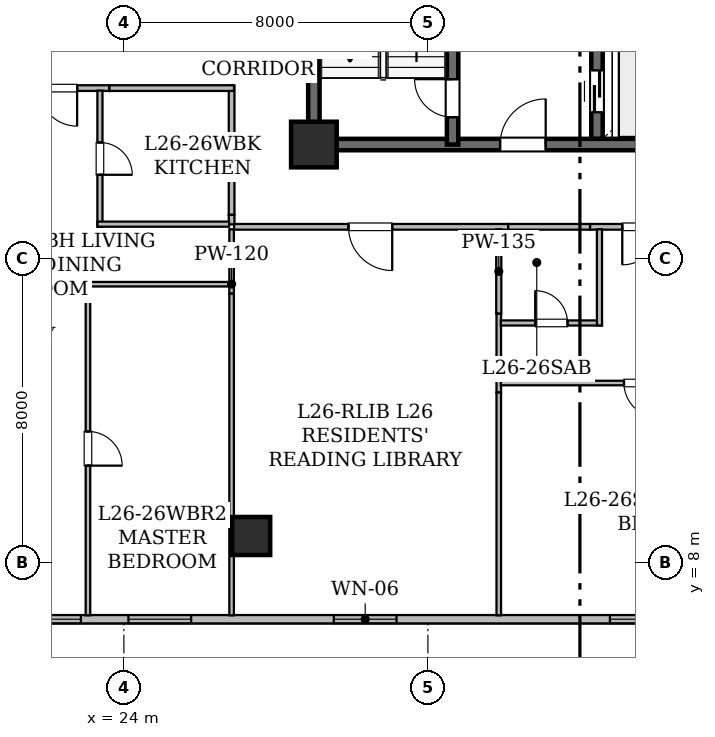
"""IFC4 building model, lengths in metres.
Left out: names, types, materials, properties, quantities, classifications, styles, units other than length and angle.
Written with IfcOpenShell. Run it as: python <this file> out.ifc"""

import sys

from ifc_helpers import new_model, si_unit, direction, frame, frame_2d, origin, origin_2d, place, context, subcontext, project, spatial, rectangle, hollow_rectangle, extrude, element, fill, save


model = new_model("IFC4")
c1 = context("Model", 3, precision=1e-05, world=origin(), true_north=direction((0.0, 1.0)))
c2 = subcontext(c1, "Body", "Model", "MODEL_VIEW")
j1 = project(units=[si_unit("LENGTHUNIT", "METRE"), si_unit("PLANEANGLEUNIT", "RADIAN")], contexts=[c1])
p1 = place(None, origin())
s1 = spatial("IfcSite", under=j1, at=p1, CompositionType="ELEMENT")
p2 = place(p1, origin())
s2 = spatial("IfcBuilding", under=s1, at=p2, CompositionType="ELEMENT")
p3 = place(p2, frame((0.0, 0.0, 105.55)))
s3 = spatial("IfcBuildingStorey", under=s2, at=p3, CompositionType="ELEMENT", Elevation=105.55)
p4 = place(p3, frame((29.0, 19.0, 0.0), z_axis=(0.0, 0.0, 1.0), x_axis=(1.0, 0.0, 0.0)))
e1 = element("IfcColumn", 1, at=p4, inside=s3, PredefinedType="COLUMN", context=c2, shape_type="SweptSolid", body=[
    extrude(hollow_rectangle(XDim=1.2, YDim=1.2, WallThickness=0.06, at=origin_2d()), origin(), (0.0, 0.0, 1.0), 3.65),
])
p5 = place(p3, frame((27.35, 8.7, 0.0), z_axis=(0.0, 0.0, 1.0), x_axis=(1.0, 0.0, 0.0)))
e2 = element("IfcColumn", 2, at=p5, inside=s3, PredefinedType="COLUMN", context=c2, shape_type="SweptSolid", body=[
    extrude(hollow_rectangle(XDim=1.0, YDim=1.0, WallThickness=0.05, at=origin_2d()), origin(), (0.0, 0.0, 1.0), 3.65),
])
p6 = place(p3, frame((52.283, 6.51, 0.0), z_axis=(0.0, 0.0, 1.0), x_axis=(-1.0, 0.0, 0.0)))
e3 = element("IfcWall", 3, at=p6, inside=s3, PredefinedType="STANDARD", context=c2, shape_type="SweptSolid", body=[
    extrude(rectangle(XDim=38.568, YDim=0.22, at=frame_2d((19.284, 0.0))), origin(), (0.0, 0.0, 1.0), 3.43),
])
p7 = place(p6, frame((21.108, 0.0, 0.85)))
e4 = element("IfcOpeningElement", 4, at=p7, cuts=e3, PredefinedType="OPENING", context=c2, shape_type="SweptSolid", body=[
    extrude(rectangle(XDim=1.65, YDim=1.55, at=frame_2d((0.825, 0.775))), frame((0.0, 0.12, 0.0), z_axis=(0.0, -1.0, 0.0), x_axis=(1.0, 0.0, 0.0)), (0.0, 0.0, 1.0), 0.24),
])
p8 = place(p6, frame((35.355, 0.0, 0.85)))
e5 = element("IfcOpeningElement", 5, at=p8, cuts=e3, PredefinedType="OPENING", context=c2, shape_type="SweptSolid", body=[
    extrude(rectangle(XDim=1.65, YDim=1.55, at=frame_2d((0.825, 0.775))), frame((0.0, 0.12, 0.0), z_axis=(0.0, -1.0, 0.0), x_axis=(1.0, 0.0, 0.0)), (0.0, 0.0, 1.0), 0.24),
])
p9 = place(p6, frame((29.413, 0.0, 0.8)))
e6 = element("IfcOpeningElement", 6, at=p9, cuts=e3, PredefinedType="OPENING", context=c2, shape_type="SweptSolid", body=[
    extrude(rectangle(XDim=1.2, YDim=1.5, at=frame_2d((0.6, 0.75))), frame((0.0, 0.12, 0.0), z_axis=(0.0, -1.0, 0.0), x_axis=(1.0, 0.0, 0.0)), (0.0, 0.0, 1.0), 0.24),
])
p10 = place(p6, frame((31.863, 0.0, 0.85)))
e7 = element("IfcOpeningElement", 7, at=p10, cuts=e3, PredefinedType="OPENING", context=c2, shape_type="SweptSolid", body=[
    extrude(rectangle(XDim=1.65, YDim=1.55, at=frame_2d((0.825, 0.775))), frame((0.0, 0.12, 0.0), z_axis=(0.0, -1.0, 0.0), x_axis=(1.0, 0.0, 0.0)), (0.0, 0.0, 1.0), 0.24),
])
p11 = place(p6, frame((26.513, 0.0, 0.85)))
e8 = element("IfcOpeningElement", 8, at=p11, cuts=e3, PredefinedType="OPENING", context=c2, shape_type="SweptSolid", body=[
    extrude(rectangle(XDim=1.65, YDim=1.55, at=frame_2d((0.825, 0.775))), frame((0.0, 0.12, 0.0), z_axis=(0.0, -1.0, 0.0), x_axis=(1.0, 0.0, 0.0)), (0.0, 0.0, 1.0), 0.24),
])
p12 = place(p6, frame((13.843, 0.0, 0.85)))
e9 = element("IfcOpeningElement", 9, at=p12, cuts=e3, PredefinedType="OPENING", context=c2, shape_type="SweptSolid", body=[
    extrude(rectangle(XDim=1.65, YDim=1.55, at=frame_2d((0.825, 0.775))), frame((0.0, 0.12, 0.0), z_axis=(0.0, -1.0, 0.0), x_axis=(1.0, 0.0, 0.0)), (0.0, 0.0, 1.0), 0.24),
])
p13 = place(p6, frame((1.479, 0.0, 0.85)))
e10 = element("IfcOpeningElement", 10, at=p13, cuts=e3, PredefinedType="OPENING", context=c2, shape_type="SweptSolid", body=[
    extrude(rectangle(XDim=1.65, YDim=1.55, at=frame_2d((0.825, 0.775))), frame((0.0, 0.12, 0.0), z_axis=(0.0, -1.0, 0.0), x_axis=(1.0, 0.0, 0.0)), (0.0, 0.0, 1.0), 0.24),
])
p14 = place(p3, frame((29.0, 19.0, 0.0), z_axis=(0.0, 0.0, 1.0), x_axis=(0.0, 1.0, 0.0)))
e11 = element("IfcWall", 11, at=p14, inside=s3, PredefinedType="SHEAR", context=c2, shape_type="SweptSolid", body=[
    extrude(rectangle(XDim=9.0, YDim=0.3, at=frame_2d((4.5, 0.0))), origin(), (0.0, 0.0, 1.0), 3.43),
])
p15 = place(p3, frame((29.0, 19.0, 0.0), z_axis=(0.0, 0.0, 1.0), x_axis=(1.0, 0.0, 0.0)))
e12 = element("IfcWall", 12, at=p15, inside=s3, PredefinedType="SHEAR", context=c2, shape_type="SweptSolid", body=[
    extrude(rectangle(XDim=10.4, YDim=0.3, at=frame_2d((5.2, 0.0))), origin(), (0.0, 0.0, 1.0), 3.43),
])
p16 = place(p15, frame((4.9, 0.0, 0.0)))
e13 = element("IfcOpeningElement", 13, at=p16, cuts=e12, PredefinedType="OPENING", context=c2, shape_type="SweptSolid", body=[
    extrude(rectangle(XDim=1.2, YDim=2.15, at=frame_2d((0.6, 1.075))), frame((0.0, 0.16, 0.0), z_axis=(0.0, -1.0, 0.0), x_axis=(1.0, 0.0, 0.0)), (0.0, 0.0, 1.0), 0.32),
])
p17 = place(p3, frame((32.65, 19.0, 0.0), z_axis=(0.0, 0.0, 1.0), x_axis=(0.0, 1.0, 0.0)))
e14 = element("IfcWall", 14, at=p17, inside=s3, PredefinedType="SHEAR", context=c2, shape_type="SweptSolid", body=[
    extrude(rectangle(XDim=9.0, YDim=0.3, at=frame_2d((4.5, 0.0))), origin(), (0.0, 0.0, 1.0), 3.43),
])
p18 = place(p17, frame((0.72, 0.0, 0.0)))
e15 = element("IfcOpeningElement", 15, at=p18, cuts=e14, PredefinedType="OPENING", context=c2, shape_type="SweptSolid", body=[
    extrude(rectangle(XDim=1.0, YDim=2.15, at=frame_2d((0.5, 1.075))), frame((0.0, 0.16, 0.0), z_axis=(0.0, -1.0, 0.0), x_axis=(1.0, 0.0, 0.0)), (0.0, 0.0, 1.0), 0.32),
])
p19 = place(p3, frame((36.45, 19.154, 0.0), z_axis=(0.0, 0.0, 1.0), x_axis=(0.0, 1.0, 0.0)))
e16 = element("IfcWall", 16, at=p19, inside=s3, PredefinedType="SHEAR", context=c2, shape_type="SweptSolid", body=[
    extrude(rectangle(XDim=4.646, YDim=0.3, at=frame_2d((2.323, 0.0))), origin(), (0.0, 0.0, 1.0), 3.43),
])
p20 = place(p19, frame((0.696, 0.0, 0.0)))
e17 = element("IfcOpeningElement", 17, at=p20, cuts=e16, PredefinedType="OPENING", context=c2, shape_type="SweptSolid", body=[
    extrude(rectangle(XDim=1.1, YDim=2.15, at=frame_2d((0.55, 1.075))), frame((0.0, 0.16, 0.0), z_axis=(0.0, -1.0, 0.0), x_axis=(1.0, 0.0, 0.0)), (0.0, 0.0, 1.0), 0.32),
])
p21 = place(p19, frame((3.316, 0.0, 0.0)))
e18 = element("IfcOpeningElement", 18, at=p21, cuts=e16, PredefinedType="OPENING", context=c2, shape_type="SweptSolid", body=[
    extrude(rectangle(XDim=1.1, YDim=2.15, at=frame_2d((0.55, 1.075))), frame((0.0, 0.16, 0.0), z_axis=(0.0, -1.0, 0.0), x_axis=(1.0, 0.0, 0.0)), (0.0, 0.0, 1.0), 0.32),
])
p22 = place(p3, frame((34.114, 16.835, 0.0), z_axis=(0.0, 0.0, 1.0), x_axis=(-1.0, 0.0, 0.0)))
e19 = element("IfcWall", 19, at=p22, inside=s3, PredefinedType="STANDARD", context=c2, shape_type="SweptSolid", body=[
    extrude(rectangle(XDim=7.214, YDim=0.15, at=frame_2d((3.607, 0.0))), origin(), (0.0, 0.0, 1.0), 2.647),
])
p23 = place(p22, frame((3.053, 0.0, 0.0)))
e20 = element("IfcOpeningElement", 20, at=p23, cuts=e19, PredefinedType="OPENING", context=c2, shape_type="SweptSolid", body=[
    extrude(rectangle(XDim=1.15, YDim=2.2, at=frame_2d((0.575, 1.1))), frame((0.0, 0.085, 0.0), z_axis=(0.0, -1.0, 0.0), x_axis=(1.0, 0.0, 0.0)), (0.0, 0.0, 1.0), 0.17),
])
p24 = place(p3, frame((26.835, 16.9, 0.0), z_axis=(0.0, 0.0, 1.0), x_axis=(0.0, 1.0, 0.0)))
e21 = element("IfcWall", 21, at=p24, inside=s3, PredefinedType="STANDARD", context=c2, shape_type="SweptSolid", body=[
    extrude(rectangle(XDim=0.254, YDim=0.15, at=frame_2d((0.127, 0.0))), origin(), (0.0, 0.0, 1.0), 3.43),
])
p25 = place(p3, frame((23.619, 20.485, 0.0), z_axis=(0.0, 0.0, 1.0), x_axis=(-1.0, 0.0, 0.0)))
e22 = element("IfcWall", 22, at=p25, inside=s3, PredefinedType="STANDARD", context=c2, shape_type="SweptSolid", body=[
    extrude(rectangle(XDim=2.698, YDim=0.15, at=frame_2d((1.349, 0.0))), origin(), (0.0, 0.0, 1.0), 3.43),
])
p26 = place(p25, frame((0.849, 0.0, 0.0)))
e23 = element("IfcOpeningElement", 23, at=p26, cuts=e22, PredefinedType="OPENING", context=c2, shape_type="SweptSolid", body=[
    extrude(rectangle(XDim=1.0, YDim=2.15, at=frame_2d((0.5, 1.075))), frame((0.0, 0.085, 0.0), z_axis=(0.0, -1.0, 0.0), x_axis=(1.0, 0.0, 0.0)), (0.0, 0.0, 1.0), 0.17),
])
p27 = place(p3, frame((26.835, 17.154, 0.0), z_axis=(0.0, 0.0, 1.0), x_axis=(0.0, 1.0, 0.0)))
e24 = element("IfcWall", 24, at=p27, inside=s3, PredefinedType="STANDARD", context=c2, shape_type="SweptSolid", body=[
    extrude(rectangle(XDim=3.396, YDim=0.15, at=frame_2d((1.698, 0.0))), origin(), (0.0, 0.0, 1.0), 2.647),
])
p28 = place(p3, frame((26.898, 20.485, 0.0), z_axis=(0.0, 0.0, 1.0), x_axis=(-1.0, 0.0, 0.0)))
e25 = element("IfcWall", 25, at=p28, inside=s3, PredefinedType="STANDARD", context=c2, shape_type="SweptSolid", body=[
    extrude(rectangle(XDim=3.279, YDim=0.15, at=frame_2d((1.64, 0.0))), origin(), (0.0, 0.0, 1.0), 3.43),
])
p29 = place(p3, frame((38.964, 16.835, 0.0), z_axis=(0.0, 0.0, 1.0), x_axis=(-1.0, 0.0, 0.0)))
e26 = element("IfcWall", 26, at=p29, inside=s3, PredefinedType="STANDARD", context=c2, shape_type="SweptSolid", body=[
    extrude(rectangle(XDim=2.698, YDim=0.15, at=frame_2d((1.349, 0.0))), origin(), (0.0, 0.0, 1.0), 3.43),
])
p30 = place(p29, frame((0.849, 0.0, 0.0)))
e27 = element("IfcOpeningElement", 27, at=p30, cuts=e26, PredefinedType="OPENING", context=c2, shape_type="SweptSolid", body=[
    extrude(rectangle(XDim=1.0, YDim=2.15, at=frame_2d((0.5, 1.075))), frame((0.0, 0.085, 0.0), z_axis=(0.0, -1.0, 0.0), x_axis=(1.0, 0.0, 0.0)), (0.0, 0.0, 1.0), 0.17),
])
p31 = place(p3, frame((36.266, 16.835, 0.0), z_axis=(0.0, 0.0, 1.0), x_axis=(-1.0, 0.0, 0.0)))
e28 = element("IfcWall", 28, at=p31, inside=s3, PredefinedType="STANDARD", context=c2, shape_type="SweptSolid", body=[
    extrude(rectangle(XDim=2.152, YDim=0.15, at=frame_2d((1.076, 0.0))), origin(), (0.0, 0.0, 1.0), 3.43),
])
p32 = place(p3, frame((26.835, 15.076, 0.0), z_axis=(0.0, 0.0, 1.0), x_axis=(0.0, 1.0, 0.0)))
e29 = element("IfcWall", 29, at=p32, inside=s3, PredefinedType="PARTITIONING", context=c2, shape_type="SweptSolid", body=[
    extrude(rectangle(XDim=1.694, YDim=0.12, at=frame_2d((0.847, 0.0))), origin(), (0.0, 0.0, 1.0), 3.43),
])
p33 = place(p3, frame((26.835, 6.612, 0.0), z_axis=(0.0, 0.0, 1.0), x_axis=(0.0, 1.0, 0.0)))
e30 = element("IfcWall", 30, at=p33, inside=s3, PredefinedType="PARTITIONING", context=c2, shape_type="SweptSolid", body=[
    extrude(rectangle(XDim=8.464, YDim=0.12, at=frame_2d((4.232, 0.0))), origin(), (0.0, 0.0, 1.0), 2.876),
])
p34 = place(p3, frame((33.865, 14.554, 0.0), z_axis=(0.0, 0.0, 1.0), x_axis=(0.0, -1.0, 0.0)))
e31 = element("IfcWall", 31, at=p34, inside=s3, PredefinedType="PARTITIONING", context=c2, shape_type="SweptSolid", body=[
    extrude(rectangle(XDim=2.078, YDim=0.12, at=frame_2d((1.039, 0.0))), origin(), (0.0, 0.0, 1.0), 3.43),
])
p35 = place(p3, frame((33.865, 16.77, 0.0), z_axis=(0.0, 0.0, 1.0), x_axis=(0.0, -1.0, 0.0)))
e32 = element("IfcWall", 32, at=p35, inside=s3, PredefinedType="PARTITIONING", context=c2, shape_type="SweptSolid", body=[
    extrude(rectangle(XDim=2.216, YDim=0.135, at=frame_2d((1.108, 0.0))), origin(), (0.0, 0.0, 1.0), 3.43),
])
p36 = place(p3, frame((33.865, 12.476, 0.0), z_axis=(0.0, 0.0, 1.0), x_axis=(0.0, -1.0, 0.0)))
e33 = element("IfcWall", 33, at=p36, inside=s3, PredefinedType="PARTITIONING", context=c2, shape_type="SweptSolid", body=[
    extrude(rectangle(XDim=5.864, YDim=0.12, at=frame_2d((2.932, 0.0))), origin(), (0.0, 0.0, 1.0), 2.876),
])
p37 = place(p3, frame((23.37, 20.418, 0.0), z_axis=(0.0, 0.0, 1.0), x_axis=(0.0, -1.0, 0.0)))
e34 = element("IfcWall", 34, at=p37, inside=s3, PredefinedType="PARTITIONING", context=c2, shape_type="SweptSolid", body=[
    extrude(rectangle(XDim=3.578, YDim=0.135, at=frame_2d((1.789, 0.0))), origin(), (0.0, 0.0, 1.0), 2.647),
])
p38 = place(p37, frame((1.364, 0.0, 0.0)))
e35 = element("IfcOpeningElement", 35, at=p38, cuts=e34, PredefinedType="OPENING", context=c2, shape_type="SweptSolid", body=[
    extrude(rectangle(XDim=0.85, YDim=2.1, at=frame_2d((0.425, 1.05))), frame((0.0, 0.077, 0.0), z_axis=(0.0, -1.0, 0.0), x_axis=(1.0, 0.0, 0.0)), (0.0, 0.0, 1.0), 0.155),
])
p39 = place(p3, frame((23.305, 16.905, 0.0), z_axis=(0.0, 0.0, 1.0), x_axis=(1.0, 0.0, 0.0)))
e36 = element("IfcWall", 36, at=p39, inside=s3, PredefinedType="PARTITIONING", context=c2, shape_type="SweptSolid", body=[
    extrude(rectangle(XDim=3.465, YDim=0.135, at=frame_2d((1.732, 0.0))), origin(), (0.0, 0.0, 1.0), 3.43),
])
p40 = place(p3, frame((26.781, 15.325, 0.0), z_axis=(0.0, 0.0, 1.0), x_axis=(-1.0, 0.0, 0.0)))
e37 = element("IfcWall", 37, at=p40, inside=s3, PredefinedType="PARTITIONING", context=c2, shape_type="SweptSolid", body=[
    extrude(rectangle(XDim=3.791, YDim=0.12, at=frame_2d((1.896, 0.0))), origin(), (0.0, 0.0, 1.0), 3.43),
])
p41 = place(p3, frame((23.055, 15.39, 0.0), z_axis=(0.0, 0.0, 1.0), x_axis=(0.0, -1.0, 0.0)))
e38 = element("IfcWall", 38, at=p41, inside=s3, PredefinedType="PARTITIONING", context=c2, shape_type="SweptSolid", body=[
    extrude(rectangle(XDim=8.778, YDim=0.12, at=frame_2d((4.389, 0.0))), origin(), (0.0, 0.0, 1.0), 2.876),
])
p42 = place(p41, frame((3.939, 0.0, 0.0)))
e39 = element("IfcOpeningElement", 39, at=p42, cuts=e38, PredefinedType="OPENING", context=c2, shape_type="SweptSolid", body=[
    extrude(rectangle(XDim=0.9, YDim=2.1, at=frame_2d((0.45, 1.05))), frame((0.0, 0.07, 0.0), z_axis=(0.0, -1.0, 0.0), x_axis=(1.0, 0.0, 0.0)), (0.0, 0.0, 1.0), 0.14),
])
p43 = place(p3, frame((33.919, 14.305, 0.0), z_axis=(0.0, 0.0, 1.0), x_axis=(1.0, 0.0, 0.0)))
e40 = element("IfcWall", 40, at=p43, inside=s3, PredefinedType="PARTITIONING", context=c2, shape_type="SweptSolid", body=[
    extrude(rectangle(XDim=2.661, YDim=0.135, at=frame_2d((1.331, 0.0))), origin(), (0.0, 0.0, 1.0), 3.43),
])
p44 = place(p43, frame((0.905, 0.0, 0.0)))
e41 = element("IfcOpeningElement", 41, at=p44, cuts=e40, PredefinedType="OPENING", context=c2, shape_type="SweptSolid", body=[
    extrude(rectangle(XDim=0.85, YDim=2.1, at=frame_2d((0.425, 1.05))), frame((0.0, 0.077, 0.0), z_axis=(0.0, -1.0, 0.0), x_axis=(1.0, 0.0, 0.0)), (0.0, 0.0, 1.0), 0.155),
])
p45 = place(p3, frame((36.515, 14.24, 0.0), z_axis=(0.0, 0.0, 1.0), x_axis=(0.0, 1.0, 0.0)))
e42 = element("IfcWall", 42, at=p45, inside=s3, PredefinedType="PARTITIONING", context=c2, shape_type="SweptSolid", body=[
    extrude(rectangle(XDim=2.53, YDim=0.135, at=frame_2d((1.265, 0.0))), origin(), (0.0, 0.0, 1.0), 3.43),
])
p46 = place(p3, frame((41.3, 12.725, 0.0), z_axis=(0.0, 0.0, 1.0), x_axis=(-1.0, 0.0, 0.0)))
e43 = element("IfcWall", 43, at=p46, inside=s3, PredefinedType="PARTITIONING", context=c2, shape_type="SweptSolid", body=[
    extrude(rectangle(XDim=7.381, YDim=0.12, at=frame_2d((3.69, 0.0))), origin(), (0.0, 0.0, 1.0), 2.647),
])
p47 = place(p46, frame((3.24, 0.0, 0.0)))
e44 = element("IfcOpeningElement", 44, at=p47, cuts=e43, PredefinedType="OPENING", context=c2, shape_type="SweptSolid", body=[
    extrude(rectangle(XDim=0.9, YDim=2.1, at=frame_2d((0.45, 1.05))), frame((0.0, 0.07, 0.0), z_axis=(0.0, -1.0, 0.0), x_axis=(1.0, 0.0, 0.0)), (0.0, 0.0, 1.0), 0.14),
])
p48 = place(p7, origin())
e45 = element("IfcWindow", 45, at=p48, inside=s3, PartitioningType="SINGLE_PANEL", PredefinedType="WINDOW", context=c2, shape_type="SweptSolid", body=[
    extrude(rectangle(XDim=1.65, YDim=1.55, at=frame_2d((0.825, 0.775))), frame((0.0, 0.03, 0.0), z_axis=(0.0, -1.0, 0.0), x_axis=(1.0, 0.0, 0.0)), (0.0, 0.0, 1.0), 0.06),
])
fill(e4, e45)
p49 = place(p9, origin())
e46 = element("IfcWindow", 46, at=p49, inside=s3, PartitioningType="SINGLE_PANEL", PredefinedType="WINDOW", context=c2, shape_type="SweptSolid", body=[
    extrude(rectangle(XDim=1.2, YDim=1.5, at=frame_2d((0.6, 0.75))), frame((0.0, 0.03, 0.0), z_axis=(0.0, -1.0, 0.0), x_axis=(1.0, 0.0, 0.0)), (0.0, 0.0, 1.0), 0.06),
])
fill(e6, e46)
p50 = place(p11, origin())
e47 = element("IfcWindow", 47, at=p50, inside=s3, PartitioningType="SINGLE_PANEL", PredefinedType="WINDOW", context=c2, shape_type="SweptSolid", body=[
    extrude(rectangle(XDim=1.65, YDim=1.55, at=frame_2d((0.825, 0.775))), frame((0.0, 0.03, 0.0), z_axis=(0.0, -1.0, 0.0), x_axis=(1.0, 0.0, 0.0)), (0.0, 0.0, 1.0), 0.06),
])
fill(e8, e47)
p51 = place(p12, origin())
e48 = element("IfcWindow", 48, at=p51, inside=s3, PartitioningType="SINGLE_PANEL", PredefinedType="WINDOW", context=c2, shape_type="SweptSolid", body=[
    extrude(rectangle(XDim=1.65, YDim=1.55, at=frame_2d((0.825, 0.775))), frame((0.0, 0.03, 0.0), z_axis=(0.0, -1.0, 0.0), x_axis=(1.0, 0.0, 0.0)), (0.0, 0.0, 1.0), 0.06),
])
fill(e9, e48)
p52 = place(p18, origin())
e49 = element("IfcDoor", 49, at=p52, inside=s3, OperationType="SINGLE_SWING_RIGHT", PredefinedType="DOOR", context=c2, shape_type="SweptSolid", body=[
    extrude(rectangle(XDim=1.0, YDim=2.15, at=frame_2d((0.5, 1.075))), frame((0.0, 0.025, 0.0), z_axis=(0.0, -1.0, 0.0), x_axis=(1.0, 0.0, 0.0)), (0.0, 0.0, 1.0), 0.05),
])
fill(e15, e49)
p53 = place(p16, origin())
e50 = element("IfcDoor", 50, at=p53, inside=s3, OperationType="SINGLE_SWING_RIGHT", PredefinedType="DOOR", context=c2, shape_type="SweptSolid", body=[
    extrude(rectangle(XDim=1.2, YDim=2.15, at=frame_2d((0.6, 1.075))), frame((0.0, 0.025, 0.0), z_axis=(0.0, -1.0, 0.0), x_axis=(1.0, 0.0, 0.0)), (0.0, 0.0, 1.0), 0.05),
])
fill(e13, e50)
p54 = place(p20, origin())
e51 = element("IfcDoor", 51, at=p54, inside=s3, OperationType="SLIDING_TO_LEFT", PredefinedType="DOOR", context=c2, shape_type="SweptSolid", body=[
    extrude(rectangle(XDim=1.1, YDim=2.15, at=frame_2d((0.55, 1.075))), frame((0.0, 0.025, 0.0), z_axis=(0.0, -1.0, 0.0), x_axis=(1.0, 0.0, 0.0)), (0.0, 0.0, 1.0), 0.05),
])
fill(e17, e51)
p55 = place(p23, origin())
e52 = element("IfcDoor", 52, at=p55, inside=s3, OperationType="SINGLE_SWING_LEFT", PredefinedType="DOOR", context=c2, shape_type="SweptSolid", body=[
    extrude(rectangle(XDim=1.15, YDim=2.2, at=frame_2d((0.575, 1.1))), frame((0.0, 0.025, 0.0), z_axis=(0.0, -1.0, 0.0), x_axis=(1.0, 0.0, 0.0)), (0.0, 0.0, 1.0), 0.05),
])
fill(e20, e52)
p56 = place(p26, origin())
e53 = element("IfcDoor", 53, at=p56, inside=s3, OperationType="SINGLE_SWING_LEFT", PredefinedType="DOOR", context=c2, shape_type="SweptSolid", body=[
    extrude(rectangle(XDim=1.0, YDim=2.15, at=frame_2d((0.5, 1.075))), frame((0.0, 0.025, 0.0), z_axis=(0.0, -1.0, 0.0), x_axis=(1.0, 0.0, 0.0)), (0.0, 0.0, 1.0), 0.05),
])
fill(e23, e53)
p57 = place(p30, origin())
e54 = element("IfcDoor", 54, at=p57, inside=s3, OperationType="SINGLE_SWING_RIGHT", PredefinedType="DOOR", context=c2, shape_type="SweptSolid", body=[
    extrude(rectangle(XDim=1.0, YDim=2.15, at=frame_2d((0.5, 1.075))), frame((0.0, 0.025, 0.0), z_axis=(0.0, -1.0, 0.0), x_axis=(1.0, 0.0, 0.0)), (0.0, 0.0, 1.0), 0.05),
])
fill(e27, e54)
p58 = place(p38, origin())
e55 = element("IfcDoor", 55, at=p58, inside=s3, OperationType="SINGLE_SWING_RIGHT", PredefinedType="DOOR", context=c2, shape_type="SweptSolid", body=[
    extrude(rectangle(XDim=0.85, YDim=2.1, at=frame_2d((0.425, 1.05))), frame((0.0, 0.025, 0.0), z_axis=(0.0, -1.0, 0.0), x_axis=(1.0, 0.0, 0.0)), (0.0, 0.0, 1.0), 0.05),
])
fill(e35, e55)
p59 = place(p42, origin())
e56 = element("IfcDoor", 56, at=p59, inside=s3, OperationType="SINGLE_SWING_RIGHT", PredefinedType="DOOR", context=c2, shape_type="SweptSolid", body=[
    extrude(rectangle(XDim=0.9, YDim=2.1, at=frame_2d((0.45, 1.05))), frame((0.0, 0.025, 0.0), z_axis=(0.0, -1.0, 0.0), x_axis=(1.0, 0.0, 0.0)), (0.0, 0.0, 1.0), 0.05),
])
fill(e39, e56)
p60 = place(p44, origin())
e57 = element("IfcDoor", 57, at=p60, inside=s3, OperationType="SINGLE_SWING_LEFT", PredefinedType="DOOR", context=c2, shape_type="SweptSolid", body=[
    extrude(rectangle(XDim=0.85, YDim=2.1, at=frame_2d((0.425, 1.05))), frame((0.0, 0.025, 0.0), z_axis=(0.0, -1.0, 0.0), x_axis=(1.0, 0.0, 0.0)), (0.0, 0.0, 1.0), 0.05),
])
fill(e41, e57)
p61 = place(p47, origin())
e58 = element("IfcDoor", 58, at=p61, inside=s3, OperationType="SINGLE_SWING_LEFT", PredefinedType="DOOR", context=c2, shape_type="SweptSolid", body=[
    extrude(rectangle(XDim=0.9, YDim=2.1, at=frame_2d((0.45, 1.05))), frame((0.0, 0.025, 0.0), z_axis=(0.0, -1.0, 0.0), x_axis=(1.0, 0.0, 0.0)), (0.0, 0.0, 1.0), 0.05),
])
fill(e44, e58)
save(model, sys.argv[1])
